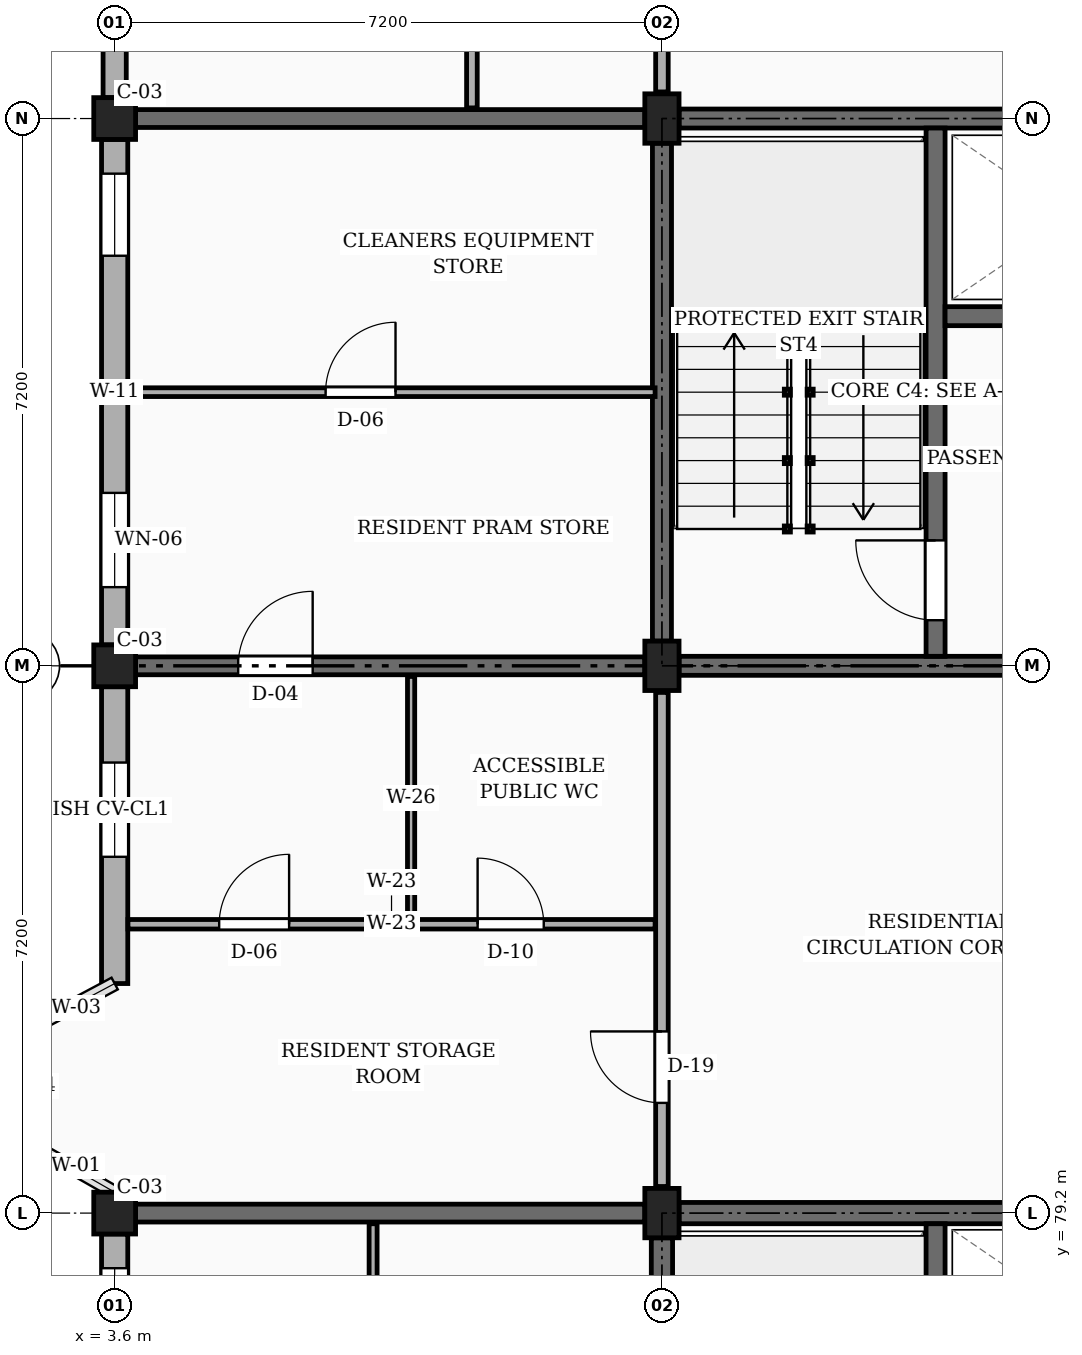
"""IFC4 building model, lengths in metres.
Left out: names, types, materials, properties, quantities, classifications, styles, units other than length and angle.
Written with IfcOpenShell. Run it as: python <this file> out.ifc"""

import sys

from ifc_helpers import new_model, si_unit, direction, frame, frame_2d, origin, origin_2d, place, context, subcontext, project, spatial, rectangle, extrude, element, fill, save


model = new_model("IFC4")
c1 = context("Model", 3, precision=1e-05, world=origin(), true_north=direction((0.0, 1.0)))
c2 = subcontext(c1, "Body", "Model", "MODEL_VIEW")
j1 = project(units=[si_unit("LENGTHUNIT", "METRE"), si_unit("PLANEANGLEUNIT", "RADIAN")], contexts=[c1])
p1 = place(None, origin())
s1 = spatial("IfcSite", under=j1, at=p1, CompositionType="ELEMENT")
p2 = place(p1, origin())
s2 = spatial("IfcBuilding", under=s1, at=p2, CompositionType="ELEMENT")
p3 = place(p2, frame((0.0, 0.0, 17.1)))
s3 = spatial("IfcBuildingStorey", under=s2, at=p3, CompositionType="ELEMENT", Elevation=17.1)
for number, where, z_axis, x_axis in (
    (1, (3.6, 79.2, 0.0), (0.0, 0.0, 1.0), (1.0, 0.0, 0.0)),
    (2, (3.6, 86.4, 0.0), (0.0, 0.0, 1.0), (1.0, 0.0, 0.0)),
    (3, (3.6, 93.6, 0.0), (0.0, 0.0, 1.0), (1.0, 0.0, 0.0)),
):
    element("IfcColumn", number, at=place(p3, frame(where, z_axis=z_axis, x_axis=x_axis)), inside=s3, PredefinedType="COLUMN", context=c2, shape_type="SweptSolid", body=[
        extrude(rectangle(XDim=0.55, YDim=0.55, at=origin_2d()), origin(), (0.0, 0.0, 1.0), 3.15),
    ])
for number, where, z_axis, x_axis in (
    (4, (10.8, 79.2, 0.0), (0.0, 0.0, 1.0), (1.0, 0.0, 0.0)),
    (5, (10.8, 86.4, 0.0), (0.0, 0.0, 1.0), (1.0, 0.0, 0.0)),
    (6, (10.8, 93.6, 0.0), (0.0, 0.0, 1.0), (1.0, 0.0, 0.0)),
):
    element("IfcColumn", number, at=place(p3, frame(where, z_axis=z_axis, x_axis=x_axis)), inside=s3, PredefinedType="COLUMN", context=c2, shape_type="SweptSolid", body=[
        extrude(rectangle(XDim=0.45, YDim=0.65, at=origin_2d()), origin(), (0.0, 0.0, 1.0), 3.15),
    ])
p4 = place(p3, frame((3.875, 79.2, 0.0), z_axis=(0.0, 0.0, 1.0), x_axis=(1.0, 0.0, 0.0)))
e7 = element("IfcWall", 7, at=p4, inside=s3, PredefinedType="SOLIDWALL", context=c2, shape_type="SweptSolid", body=[
    extrude(rectangle(XDim=6.7, YDim=0.235, at=frame_2d((3.35, 0.0))), origin(), (0.0, 0.0, 1.0), 2.21),
])
p5 = place(p3, frame((3.875, 86.4, 0.0), z_axis=(0.0, 0.0, 1.0), x_axis=(1.0, 0.0, 0.0)))
e8 = element("IfcWall", 8, at=p5, inside=s3, PredefinedType="SOLIDWALL", context=c2, shape_type="SweptSolid", body=[
    extrude(rectangle(XDim=6.7, YDim=0.235, at=frame_2d((3.35, 0.0))), origin(), (0.0, 0.0, 1.0), 2.21),
])
p6 = place(p5, frame((1.35, 0.0, 0.0)))
e9 = element("IfcOpeningElement", 9, at=p6, cuts=e8, PredefinedType="OPENING", context=c2, shape_type="SweptSolid", body=[
    extrude(rectangle(XDim=0.98, YDim=2.12, at=frame_2d((0.49, 1.06))), frame((0.0, 0.127, 0.0), z_axis=(0.0, -1.0, 0.0), x_axis=(1.0, 0.0, 0.0)), (0.0, 0.0, 1.0), 0.255),
])
p7 = place(p3, frame((3.875, 93.6, 0.0), z_axis=(0.0, 0.0, 1.0), x_axis=(1.0, 0.0, 0.0)))
e10 = element("IfcWall", 10, at=p7, inside=s3, PredefinedType="SOLIDWALL", context=c2, shape_type="SweptSolid", body=[
    extrude(rectangle(XDim=6.7, YDim=0.235, at=frame_2d((3.35, 0.0))), origin(), (0.0, 0.0, 1.0), 2.21),
])
p8 = place(p3, frame((3.6, 100.525, 0.0), z_axis=(0.0, 0.0, 1.0), x_axis=(0.0, -1.0, 0.0)))
e11 = element("IfcWall", 11, at=p8, inside=s3, PredefinedType="SOLIDWALL", context=c2, shape_type="SweptSolid", body=[
    extrude(rectangle(XDim=6.65, YDim=0.305, at=frame_2d((3.325, 0.0))), origin(), (0.0, 0.0, 1.0), 2.48),
])
p9 = place(p8, frame((0.45, 0.0, 0.78)))
e12 = element("IfcOpeningElement", 12, at=p9, cuts=e11, PredefinedType="OPENING", context=c2, shape_type="SweptSolid", body=[
    extrude(rectangle(XDim=0.92, YDim=1.15, at=frame_2d((0.46, 0.575))), frame((0.0, 0.163, 0.0), z_axis=(0.0, -1.0, 0.0), x_axis=(1.0, 0.0, 0.0)), (0.0, 0.0, 1.0), 0.325),
])
p10 = place(p8, frame((4.65, 0.0, 0.78)))
e13 = element("IfcOpeningElement", 13, at=p10, cuts=e11, PredefinedType="OPENING", context=c2, shape_type="SweptSolid", body=[
    extrude(rectangle(XDim=1.08, YDim=1.15, at=frame_2d((0.54, 0.575))), frame((0.0, 0.163, 0.0), z_axis=(0.0, -1.0, 0.0), x_axis=(1.0, 0.0, 0.0)), (0.0, 0.0, 1.0), 0.325),
])
p11 = place(p3, frame((3.6, 93.325, 0.0), z_axis=(0.0, 0.0, 1.0), x_axis=(0.0, -1.0, 0.0)))
e14 = element("IfcWall", 14, at=p11, inside=s3, PredefinedType="SOLIDWALL", context=c2, shape_type="SweptSolid", body=[
    extrude(rectangle(XDim=6.65, YDim=0.345, at=frame_2d((3.325, 0.0))), origin(), (0.0, 0.0, 1.0), 2.48),
])
p12 = place(p11, frame((0.45, 0.0, 0.78)))
e15 = element("IfcOpeningElement", 15, at=p12, cuts=e14, PredefinedType="OPENING", context=c2, shape_type="SweptSolid", body=[
    extrude(rectangle(XDim=1.08, YDim=1.15, at=frame_2d((0.54, 0.575))), frame((0.0, 0.183, 0.0), z_axis=(0.0, -1.0, 0.0), x_axis=(1.0, 0.0, 0.0)), (0.0, 0.0, 1.0), 0.365),
])
p13 = place(p11, frame((4.65, 0.0, 0.78)))
e16 = element("IfcOpeningElement", 16, at=p13, cuts=e14, PredefinedType="OPENING", context=c2, shape_type="SweptSolid", body=[
    extrude(rectangle(XDim=1.24, YDim=1.15, at=frame_2d((0.62, 0.575))), frame((0.0, 0.183, 0.0), z_axis=(0.0, -1.0, 0.0), x_axis=(1.0, 0.0, 0.0)), (0.0, 0.0, 1.0), 0.365),
])
p14 = place(p3, frame((3.6, 86.125, 0.0), z_axis=(0.0, 0.0, 1.0), x_axis=(0.0, -1.0, 0.0)))
e17 = element("IfcWall", 17, at=p14, inside=s3, PredefinedType="SOLIDWALL", context=c2, shape_type="SweptSolid", body=[
    extrude(rectangle(XDim=3.905, YDim=0.345, at=frame_2d((1.953, 0.0))), origin(), (0.0, 0.0, 1.0), 2.48),
])
p15 = place(p14, frame((0.998, 0.0, 0.78)))
e18 = element("IfcOpeningElement", 18, at=p15, cuts=e17, PredefinedType="OPENING", context=c2, shape_type="SweptSolid", body=[
    extrude(rectangle(XDim=1.24, YDim=1.15, at=frame_2d((0.62, 0.575))), frame((0.0, 0.183, 0.0), z_axis=(0.0, -1.0, 0.0), x_axis=(1.0, 0.0, 0.0)), (0.0, 0.0, 1.0), 0.365),
])
p16 = place(p3, frame((3.6, 78.925, 0.0), z_axis=(0.0, 0.0, 1.0), x_axis=(0.0, -1.0, 0.0)))
e19 = element("IfcWall", 19, at=p16, inside=s3, PredefinedType="SOLIDWALL", context=c2, shape_type="SweptSolid", body=[
    extrude(rectangle(XDim=6.65, YDim=0.345, at=frame_2d((3.325, 0.0))), origin(), (0.0, 0.0, 1.0), 2.48),
])
p17 = place(p16, frame((0.45, 0.0, 0.78)))
e20 = element("IfcOpeningElement", 20, at=p17, cuts=e19, PredefinedType="OPENING", context=c2, shape_type="SweptSolid", body=[
    extrude(rectangle(XDim=1.32, YDim=1.15, at=frame_2d((0.66, 0.575))), frame((0.0, 0.183, 0.0), z_axis=(0.0, -1.0, 0.0), x_axis=(1.0, 0.0, 0.0)), (0.0, 0.0, 1.0), 0.365),
])
p18 = place(p16, frame((4.65, 0.0, 0.78)))
e21 = element("IfcOpeningElement", 21, at=p18, cuts=e19, PredefinedType="OPENING", context=c2, shape_type="SweptSolid", body=[
    extrude(rectangle(XDim=0.88, YDim=1.26, at=frame_2d((0.44, 0.63))), frame((0.0, 0.183, 0.0), z_axis=(0.0, -1.0, 0.0), x_axis=(1.0, 0.0, 0.0)), (0.0, 0.0, 1.0), 0.365),
])
p19 = place(p3, frame((10.8, 72.325, 0.0), z_axis=(0.0, 0.0, 1.0), x_axis=(0.0, 1.0, 0.0)))
e22 = element("IfcWall", 22, at=p19, inside=s3, PredefinedType="SHEAR", context=c2, shape_type="SweptSolid", body=[
    extrude(rectangle(XDim=6.55, YDim=0.28, at=frame_2d((3.275, 0.0))), origin(), (0.0, 0.0, 1.0), 2.91),
])
p20 = place(p3, frame((11.025, 79.2, 0.0), z_axis=(0.0, 0.0, 1.0), x_axis=(1.0, 0.0, 0.0)))
e23 = element("IfcWall", 23, at=p20, inside=s3, PredefinedType="SHEAR", context=c2, shape_type="SweptSolid", body=[
    extrude(rectangle(XDim=6.75, YDim=0.28, at=frame_2d((3.375, 0.0))), origin(), (0.0, 0.0, 1.0), 2.91),
])
p21 = place(p3, frame((14.4, 72.14, 0.0), z_axis=(0.0, 0.0, 1.0), x_axis=(0.0, 1.0, 0.0)))
e24 = element("IfcWall", 24, at=p21, inside=s3, PredefinedType="SHEAR", context=c2, shape_type="SweptSolid", body=[
    extrude(rectangle(XDim=6.92, YDim=0.25, at=frame_2d((3.46, 0.0))), origin(), (0.0, 0.0, 1.0), 2.91),
])
p22 = place(p21, frame((0.46, 0.0, 0.0)))
e25 = element("IfcOpeningElement", 25, at=p22, cuts=e24, PredefinedType="OPENING", context=c2, shape_type="SweptSolid", body=[
    extrude(rectangle(XDim=1.05, YDim=2.15, at=frame_2d((0.525, 1.075))), frame((0.0, 0.135, 0.0), z_axis=(0.0, -1.0, 0.0), x_axis=(1.0, 0.0, 0.0)), (0.0, 0.0, 1.0), 0.27),
])
p23 = place(p3, frame((10.8, 86.725, 0.0), z_axis=(0.0, 0.0, 1.0), x_axis=(0.0, 1.0, 0.0)))
e26 = element("IfcWall", 26, at=p23, inside=s3, PredefinedType="SHEAR", context=c2, shape_type="SweptSolid", body=[
    extrude(rectangle(XDim=6.55, YDim=0.25, at=frame_2d((3.275, 0.0))), origin(), (0.0, 0.0, 1.0), 2.91),
])
for number, where, z_axis, x_axis in (
    (27, (11.025, 93.6, 0.0), (0.0, 0.0, 1.0), (1.0, 0.0, 0.0)),
    (28, (11.025, 86.4, 0.0), (0.0, 0.0, 1.0), (1.0, 0.0, 0.0)),
):
    element("IfcWall", number, at=place(p3, frame(where, z_axis=z_axis, x_axis=x_axis)), inside=s3, PredefinedType="SHEAR", context=c2, shape_type="SweptSolid", body=[
        extrude(rectangle(XDim=6.75, YDim=0.25, at=frame_2d((3.375, 0.0))), origin(), (0.0, 0.0, 1.0), 2.91),
    ])
p24 = place(p3, frame((14.4, 86.525, 0.0), z_axis=(0.0, 0.0, 1.0), x_axis=(0.0, 1.0, 0.0)))
e29 = element("IfcWall", 29, at=p24, inside=s3, PredefinedType="SHEAR", context=c2, shape_type="SweptSolid", body=[
    extrude(rectangle(XDim=6.95, YDim=0.25, at=frame_2d((3.475, 0.0))), origin(), (0.0, 0.0, 1.0), 2.91),
])
p25 = place(p24, frame((0.475, 0.0, 0.0)))
e30 = element("IfcOpeningElement", 30, at=p25, cuts=e29, PredefinedType="OPENING", context=c2, shape_type="SweptSolid", body=[
    extrude(rectangle(XDim=1.05, YDim=2.15, at=frame_2d((0.525, 1.075))), frame((0.0, 0.135, 0.0), z_axis=(0.0, -1.0, 0.0), x_axis=(1.0, 0.0, 0.0)), (0.0, 0.0, 1.0), 0.27),
])
p26 = place(p3, frame((14.525, 91.0, 0.0), z_axis=(0.0, 0.0, 1.0), x_axis=(1.0, 0.0, 0.0)))
e31 = element("IfcWall", 31, at=p26, inside=s3, PredefinedType="SHEAR", context=c2, shape_type="SweptSolid", body=[
    extrude(rectangle(XDim=3.35, YDim=0.25, at=frame_2d((1.675, 0.0))), origin(), (0.0, 0.0, 1.0), 2.91),
])
p27 = place(p26, frame((1.1, 0.0, 0.0)))
e32 = element("IfcOpeningElement", 32, at=p27, cuts=e31, PredefinedType="OPENING", context=c2, shape_type="SweptSolid", body=[
    extrude(rectangle(XDim=1.0, YDim=2.2, at=frame_2d((0.5, 1.1))), frame((0.0, 0.135, 0.0), z_axis=(0.0, -1.0, 0.0), x_axis=(1.0, 0.0, 0.0)), (0.0, 0.0, 1.0), 0.27),
])
p28 = place(p3, frame((10.8, 79.55, 0.0), z_axis=(0.0, 0.0, 1.0), x_axis=(0.0, 1.0, 0.0)))
e33 = element("IfcWall", 33, at=p28, inside=s3, PredefinedType="PARTITIONING", context=c2, shape_type="SweptSolid", body=[
    extrude(rectangle(XDim=6.5, YDim=0.165, at=frame_2d((3.25, 0.0))), origin(), (0.0, 0.0, 1.0), 2.345),
])
p29 = place(p28, frame((1.1, 0.0, 0.0)))
e34 = element("IfcOpeningElement", 34, at=p29, cuts=e33, PredefinedType="OPENING", context=c2, shape_type="SweptSolid", body=[
    extrude(rectangle(XDim=0.94, YDim=2.12, at=frame_2d((0.47, 1.06))), frame((0.0, 0.093, 0.0), z_axis=(0.0, -1.0, 0.0), x_axis=(1.0, 0.0, 0.0)), (0.0, 0.0, 1.0), 0.185),
])
p30 = place(p3, frame((10.8, 93.95, 0.0), z_axis=(0.0, 0.0, 1.0), x_axis=(0.0, 1.0, 0.0)))
e35 = element("IfcWall", 35, at=p30, inside=s3, PredefinedType="PARTITIONING", context=c2, shape_type="SweptSolid", body=[
    extrude(rectangle(XDim=6.5, YDim=0.165, at=frame_2d((3.25, 0.0))), origin(), (0.0, 0.0, 1.0), 2.345),
])
p31 = place(p30, frame((1.0, 0.0, 0.0)))
e36 = element("IfcOpeningElement", 36, at=p31, cuts=e35, PredefinedType="OPENING", context=c2, shape_type="SweptSolid", body=[
    extrude(rectangle(XDim=1.14, YDim=2.18, at=frame_2d((0.57, 1.09))), frame((0.0, 0.093, 0.0), z_axis=(0.0, -1.0, 0.0), x_axis=(1.0, 0.0, 0.0)), (0.0, 0.0, 1.0), 0.185),
])
p32 = place(p3, frame((7.0, 75.37, 0.0), z_axis=(0.0, 0.0, 1.0), x_axis=(0.0, 1.0, 0.0)))
e37 = element("IfcWall", 37, at=p32, inside=s3, PredefinedType="PARTITIONING", context=c2, shape_type="SweptSolid", body=[
    extrude(rectangle(XDim=3.69, YDim=0.105, at=frame_2d((1.845, 0.0))), origin(), (0.0, 0.0, 1.0), 2.345),
])
p33 = place(p3, frame((3.775, 83.0, 0.0), z_axis=(0.0, 0.0, 1.0), x_axis=(1.0, 0.0, 0.0)))
e38 = element("IfcWall", 38, at=p33, inside=s3, PredefinedType="PARTITIONING", context=c2, shape_type="SweptSolid", body=[
    extrude(rectangle(XDim=6.935, YDim=0.125, at=frame_2d((3.468, 0.0))), origin(), (0.0, 0.0, 1.0), 2.345),
])
p34 = place(p33, frame((4.6, 0.0, 0.0)))
e39 = element("IfcOpeningElement", 39, at=p34, cuts=e38, PredefinedType="OPENING", context=c2, shape_type="SweptSolid", body=[
    extrude(rectangle(XDim=0.87, YDim=2.05, at=frame_2d((0.435, 1.025))), frame((0.0, 0.073, 0.0), z_axis=(0.0, -1.0, 0.0), x_axis=(1.0, 0.0, 0.0)), (0.0, 0.0, 1.0), 0.145),
])
p35 = place(p33, frame((1.2, 0.0, 0.0)))
e40 = element("IfcOpeningElement", 40, at=p35, cuts=e38, PredefinedType="OPENING", context=c2, shape_type="SweptSolid", body=[
    extrude(rectangle(XDim=0.92, YDim=2.1, at=frame_2d((0.46, 1.05))), frame((0.0, 0.073, 0.0), z_axis=(0.0, -1.0, 0.0), x_axis=(1.0, 0.0, 0.0)), (0.0, 0.0, 1.0), 0.145),
])
p36 = place(p3, frame((7.5, 83.07, 0.0), z_axis=(0.0, 0.0, 1.0), x_axis=(0.0, 1.0, 0.0)))
e41 = element("IfcWall", 41, at=p36, inside=s3, PredefinedType="PARTITIONING", context=c2, shape_type="SweptSolid", body=[
    extrude(rectangle(XDim=3.19, YDim=0.095, at=frame_2d((1.595, 0.0))), origin(), (0.0, 0.0, 1.0), 2.345),
])
p37 = place(p3, frame((3.775, 90.0, 0.0), z_axis=(0.0, 0.0, 1.0), x_axis=(1.0, 0.0, 0.0)))
e42 = element("IfcWall", 42, at=p37, inside=s3, PredefinedType="PARTITIONING", context=c2, shape_type="SweptSolid", body=[
    extrude(rectangle(XDim=6.935, YDim=0.115, at=frame_2d((3.468, 0.0))), origin(), (0.0, 0.0, 1.0), 2.345),
])
p38 = place(p37, frame((2.6, 0.0, 0.0)))
e43 = element("IfcOpeningElement", 43, at=p38, cuts=e42, PredefinedType="OPENING", context=c2, shape_type="SweptSolid", body=[
    extrude(rectangle(XDim=0.92, YDim=2.1, at=frame_2d((0.46, 1.05))), frame((0.0, 0.067, 0.0), z_axis=(0.0, -1.0, 0.0), x_axis=(1.0, 0.0, 0.0)), (0.0, 0.0, 1.0), 0.135),
])
p39 = place(p3, frame((8.3, 93.74, 0.0), z_axis=(0.0, 0.0, 1.0), x_axis=(0.0, 1.0, 0.0)))
e44 = element("IfcWall", 44, at=p39, inside=s3, PredefinedType="PARTITIONING", context=c2, shape_type="SweptSolid", body=[
    extrude(rectangle(XDim=6.885, YDim=0.14, at=frame_2d((3.442, 0.0))), origin(), (0.0, 0.0, 1.0), 2.345),
])
p40 = place(p39, frame((1.31, 0.0, 0.0)))
e45 = element("IfcOpeningElement", 45, at=p40, cuts=e44, PredefinedType="OPENING", context=c2, shape_type="SweptSolid", body=[
    extrude(rectangle(XDim=0.95, YDim=2.1, at=frame_2d((0.475, 1.05))), frame((0.0, 0.08, 0.0), z_axis=(0.0, -1.0, 0.0), x_axis=(1.0, 0.0, 0.0)), (0.0, 0.0, 1.0), 0.16),
])
p41 = place(p12, origin())
e46 = element("IfcWindow", 46, at=p41, inside=s3, PartitioningType="SINGLE_PANEL", PredefinedType="WINDOW", context=c2, shape_type="SweptSolid", body=[
    extrude(rectangle(XDim=1.08, YDim=1.15, at=frame_2d((0.54, 0.575))), frame((0.0, 0.03, 0.0), z_axis=(0.0, -1.0, 0.0), x_axis=(1.0, 0.0, 0.0)), (0.0, 0.0, 1.0), 0.06),
])
fill(e15, e46)
p42 = place(p13, origin())
e47 = element("IfcWindow", 47, at=p42, inside=s3, PartitioningType="SINGLE_PANEL", PredefinedType="WINDOW", context=c2, shape_type="SweptSolid", body=[
    extrude(rectangle(XDim=1.24, YDim=1.15, at=frame_2d((0.62, 0.575))), frame((0.0, 0.03, 0.0), z_axis=(0.0, -1.0, 0.0), x_axis=(1.0, 0.0, 0.0)), (0.0, 0.0, 1.0), 0.06),
])
fill(e16, e47)
p43 = place(p15, origin())
e48 = element("IfcWindow", 48, at=p43, inside=s3, PartitioningType="SINGLE_PANEL", PredefinedType="WINDOW", context=c2, shape_type="SweptSolid", body=[
    extrude(rectangle(XDim=1.24, YDim=1.15, at=frame_2d((0.62, 0.575))), frame((0.0, 0.03, 0.0), z_axis=(0.0, -1.0, 0.0), x_axis=(1.0, 0.0, 0.0)), (0.0, 0.0, 1.0), 0.06),
])
fill(e18, e48)
p44 = place(p17, origin())
e49 = element("IfcWindow", 49, at=p44, inside=s3, PartitioningType="SINGLE_PANEL", PredefinedType="WINDOW", context=c2, shape_type="SweptSolid", body=[
    extrude(rectangle(XDim=1.32, YDim=1.15, at=frame_2d((0.66, 0.575))), frame((0.0, 0.03, 0.0), z_axis=(0.0, -1.0, 0.0), x_axis=(1.0, 0.0, 0.0)), (0.0, 0.0, 1.0), 0.06),
])
fill(e20, e49)
p45 = place(p25, origin())
e50 = element("IfcDoor", 50, at=p45, inside=s3, OperationType="SINGLE_SWING_RIGHT", PredefinedType="DOOR", context=c2, shape_type="SweptSolid", body=[
    extrude(rectangle(XDim=1.05, YDim=2.15, at=frame_2d((0.525, 1.075))), frame((0.0, 0.025, 0.0), z_axis=(0.0, -1.0, 0.0), x_axis=(1.0, 0.0, 0.0)), (0.0, 0.0, 1.0), 0.05),
])
fill(e30, e50)
p46 = place(p29, origin())
e51 = element("IfcDoor", 51, at=p46, inside=s3, OperationType="SINGLE_SWING_RIGHT", PredefinedType="DOOR", context=c2, shape_type="SweptSolid", body=[
    extrude(rectangle(XDim=0.94, YDim=2.12, at=frame_2d((0.47, 1.06))), frame((0.0, 0.025, 0.0), z_axis=(0.0, -1.0, 0.0), x_axis=(1.0, 0.0, 0.0)), (0.0, 0.0, 1.0), 0.05),
])
fill(e34, e51)
p47 = place(p34, origin())
e52 = element("IfcDoor", 52, at=p47, inside=s3, OperationType="SINGLE_SWING_LEFT", PredefinedType="DOOR", context=c2, shape_type="SweptSolid", body=[
    extrude(rectangle(XDim=0.87, YDim=2.05, at=frame_2d((0.435, 1.025))), frame((0.0, 0.025, 0.0), z_axis=(0.0, -1.0, 0.0), x_axis=(1.0, 0.0, 0.0)), (0.0, 0.0, 1.0), 0.05),
])
fill(e39, e52)
p48 = place(p35, origin())
e53 = element("IfcDoor", 53, at=p48, inside=s3, OperationType="SINGLE_SWING_RIGHT", PredefinedType="DOOR", context=c2, shape_type="SweptSolid", body=[
    extrude(rectangle(XDim=0.92, YDim=2.1, at=frame_2d((0.46, 1.05))), frame((0.0, 0.025, 0.0), z_axis=(0.0, -1.0, 0.0), x_axis=(1.0, 0.0, 0.0)), (0.0, 0.0, 1.0), 0.05),
])
fill(e40, e53)
p49 = place(p38, origin())
e54 = element("IfcDoor", 54, at=p49, inside=s3, OperationType="SINGLE_SWING_RIGHT", PredefinedType="DOOR", context=c2, shape_type="SweptSolid", body=[
    extrude(rectangle(XDim=0.92, YDim=2.1, at=frame_2d((0.46, 1.05))), frame((0.0, 0.025, 0.0), z_axis=(0.0, -1.0, 0.0), x_axis=(1.0, 0.0, 0.0)), (0.0, 0.0, 1.0), 0.05),
])
fill(e43, e54)
p50 = place(p6, origin())
e55 = element("IfcDoor", 55, at=p50, inside=s3, OperationType="SINGLE_SWING_RIGHT", PredefinedType="DOOR", context=c2, shape_type="SweptSolid", body=[
    extrude(rectangle(XDim=0.98, YDim=2.12, at=frame_2d((0.49, 1.06))), frame((0.0, 0.025, 0.0), z_axis=(0.0, -1.0, 0.0), x_axis=(1.0, 0.0, 0.0)), (0.0, 0.0, 1.0), 0.05),
])
fill(e9, e55)
save(model, sys.argv[1])
